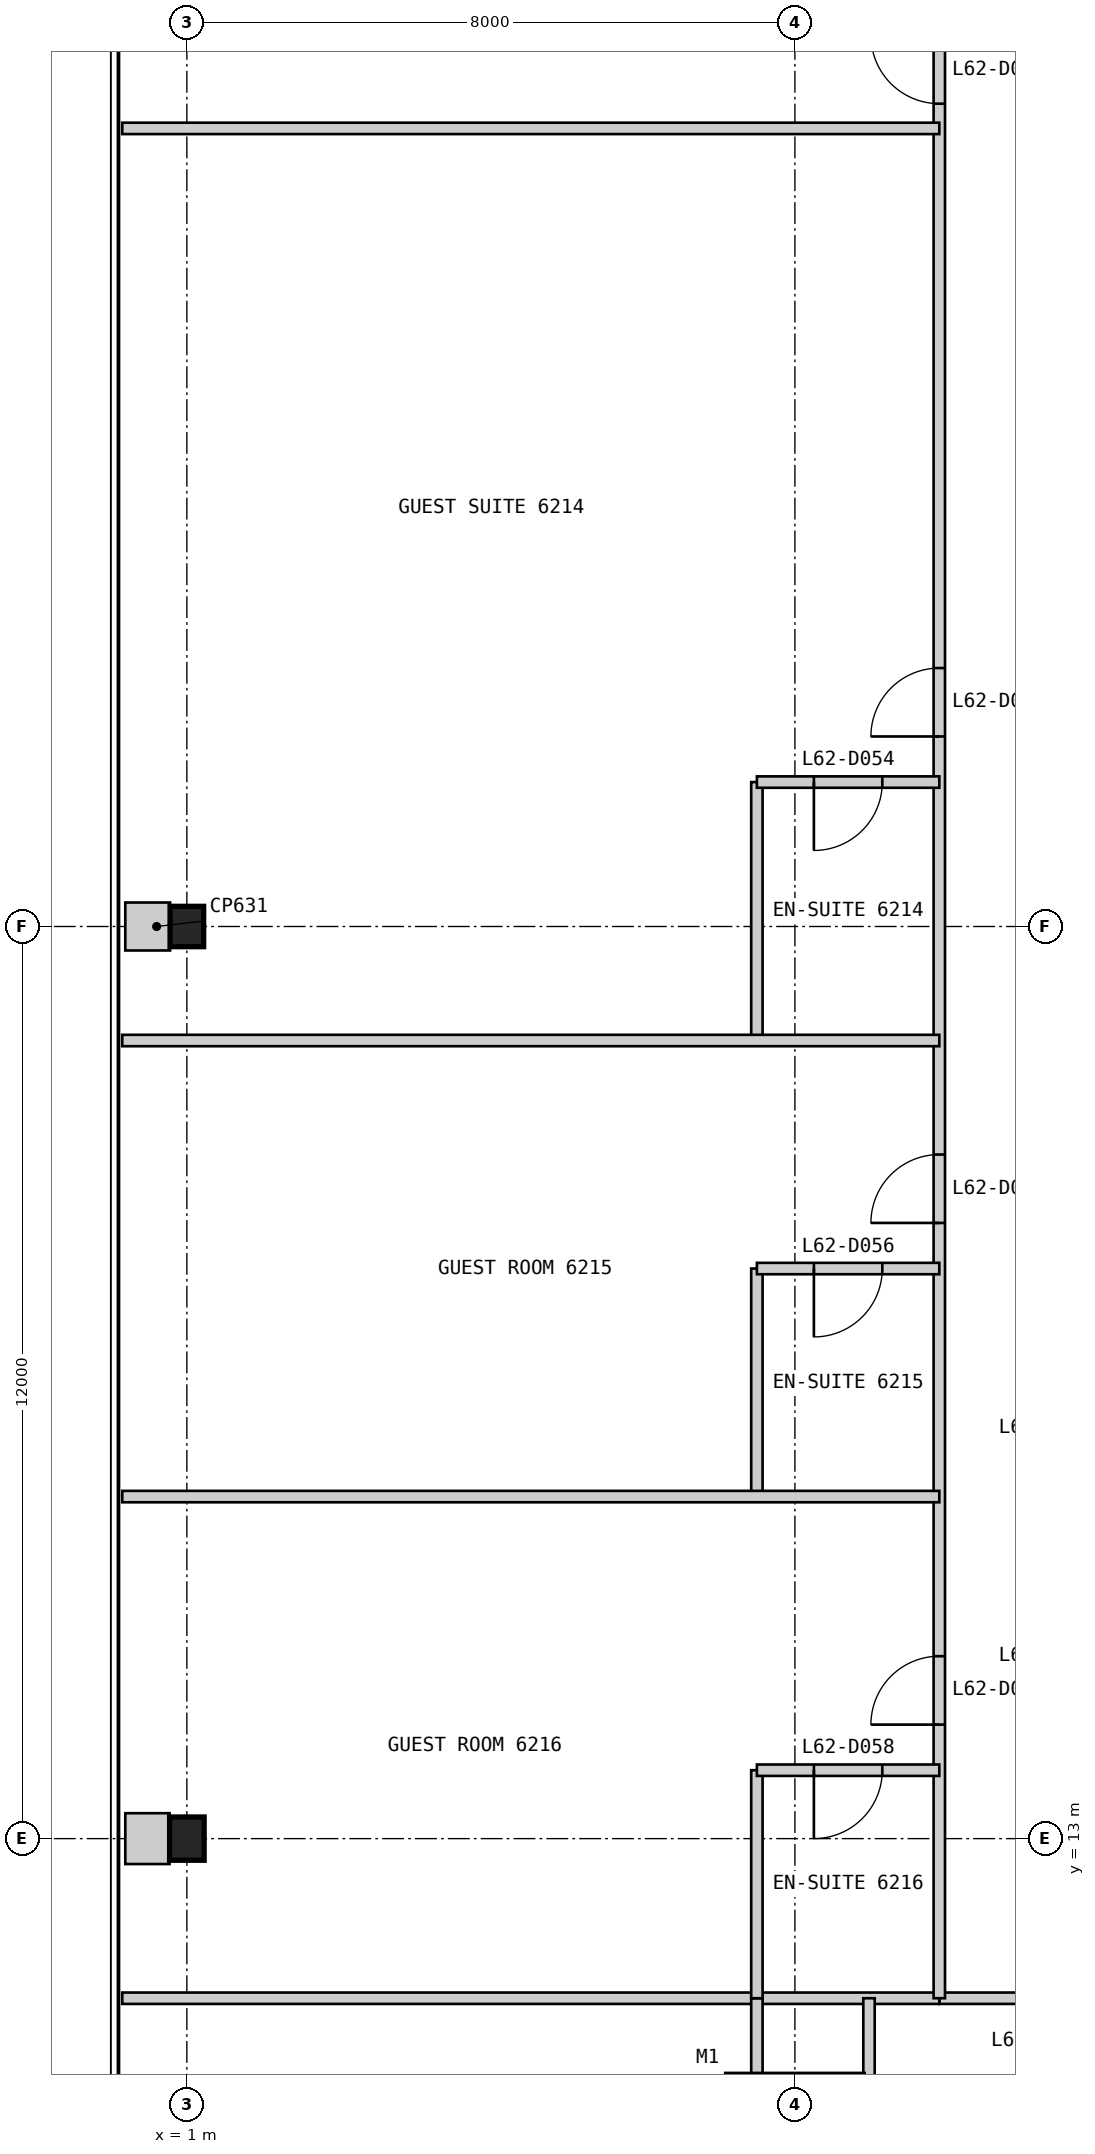
"""IFC4 building model, lengths in metres.
Left out: names, types, materials, properties, quantities, classifications, styles, units other than length and angle.
Written with IfcOpenShell. Run it as: python <this file> out.ifc"""

import sys

from ifc_helpers import new_model, si_unit, direction, frame, frame_2d, origin, origin_2d, place, context, subcontext, project, spatial, rectangle, i_section, extrude, element, fill, save


model = new_model("IFC4")
c1 = context("Model", 3, precision=1e-05, world=origin(), true_north=direction((0.0, 1.0)))
c2 = subcontext(c1, "Body", "Model", "MODEL_VIEW")
j1 = project(units=[si_unit("LENGTHUNIT", "METRE"), si_unit("PLANEANGLEUNIT", "RADIAN")], contexts=[c1])
p1 = place(None, origin())
s1 = spatial("IfcSite", under=j1, at=p1, CompositionType="ELEMENT")
p2 = place(p1, origin())
s2 = spatial("IfcBuilding", under=s1, at=p2, CompositionType="ELEMENT")
p3 = place(p2, frame((0.0, 0.0, 262.8)))
s3 = spatial("IfcBuildingStorey", under=s2, at=p3, CompositionType="ELEMENT", Elevation=262.8)
p4 = place(p3, frame((9.0, 9.0, 0.0), z_axis=(0.0, 0.0, 1.0), x_axis=(1.0, 0.0, 0.0)))
e1 = element("IfcColumn", 1, at=p4, inside=s3, PredefinedType="COLUMN", context=c2, shape_type="SweptSolid", body=[
    extrude(rectangle(XDim=1.8, YDim=1.8, at=origin_2d()), origin(), (0.0, 0.0, 1.0), 3.4),
])
p5 = place(p3, frame((1.0, 25.0, 0.0), z_axis=(0.0, 0.0, 1.0), x_axis=(1.0, 0.0, 0.0)))
e2 = element("IfcColumn", 2, at=p5, inside=s3, PredefinedType="COLUMN", context=c2, shape_type="SweptSolid", body=[
    extrude(i_section(OverallWidth=0.442, OverallDepth=0.531, WebThickness=0.066, FlangeThickness=0.106, at=origin_2d()), origin(), (0.0, 0.0, 1.0), 3.4),
])
p6 = place(p3, frame((1.0, 13.0, 0.0), z_axis=(0.0, 0.0, 1.0), x_axis=(1.0, 0.0, 0.0)))
e3 = element("IfcColumn", 3, at=p6, inside=s3, PredefinedType="COLUMN", context=c2, shape_type="SweptSolid", body=[
    extrude(i_section(OverallWidth=0.455, OverallDepth=0.569, WebThickness=0.078, FlangeThickness=0.125, at=origin_2d()), origin(), (0.0, 0.0, 1.0), 3.4),
])
p7 = place(p3, frame((10.9, 10.9, 0.0), z_axis=(0.0, 0.0, 1.0), x_axis=(1.0, 0.0, 0.0)))
e4 = element("IfcWall", 4, at=p7, inside=s3, PredefinedType="PARTITIONING", context=c2, shape_type="SweptSolid", body=[
    extrude(rectangle(XDim=28.2, YDim=0.15, at=frame_2d((14.1, 0.0))), origin(), (0.0, 0.0, 1.0), 3.25),
])
p8 = place(p7, frame((2.375, 0.0, 0.0)))
e5 = element("IfcOpeningElement", 5, at=p8, cuts=e4, PredefinedType="OPENING", context=c2, shape_type="SweptSolid", body=[
    extrude(rectangle(XDim=0.9, YDim=2.1, at=frame_2d((0.45, 1.05))), frame((0.0, 0.085, 0.0), z_axis=(0.0, -1.0, 0.0), x_axis=(1.0, 0.0, 0.0)), (0.0, 0.0, 1.0), 0.17),
])
p9 = place(p7, frame((10.7, 0.0, 0.0)))
e6 = element("IfcOpeningElement", 6, at=p9, cuts=e4, PredefinedType="OPENING", context=c2, shape_type="SweptSolid", body=[
    extrude(rectangle(XDim=0.9, YDim=2.1, at=frame_2d((0.45, 1.05))), frame((0.0, 0.085, 0.0), z_axis=(0.0, -1.0, 0.0), x_axis=(1.0, 0.0, 0.0)), (0.0, 0.0, 1.0), 0.17),
])
p10 = place(p7, frame((16.8, 0.0, 0.0)))
e7 = element("IfcOpeningElement", 7, at=p10, cuts=e4, PredefinedType="OPENING", context=c2, shape_type="SweptSolid", body=[
    extrude(rectangle(XDim=1.0, YDim=2.1, at=frame_2d((0.5, 1.05))), frame((0.0, 0.085, 0.0), z_axis=(0.0, -1.0, 0.0), x_axis=(1.0, 0.0, 0.0)), (0.0, 0.0, 1.0), 0.17),
])
p11 = place(p7, frame((23.7, 0.0, 0.0)))
e8 = element("IfcOpeningElement", 8, at=p11, cuts=e4, PredefinedType="OPENING", context=c2, shape_type="SweptSolid", body=[
    extrude(rectangle(XDim=0.9, YDim=2.1, at=frame_2d((0.45, 1.05))), frame((0.0, 0.085, 0.0), z_axis=(0.0, -1.0, 0.0), x_axis=(1.0, 0.0, 0.0)), (0.0, 0.0, 1.0), 0.17),
])
p12 = place(p3, frame((0.15, 10.9, 0.0), z_axis=(0.0, 0.0, 1.0), x_axis=(1.0, 0.0, 0.0)))
e9 = element("IfcWall", 9, at=p12, inside=s3, PredefinedType="PARTITIONING", context=c2, shape_type="SweptSolid", body=[
    extrude(rectangle(XDim=10.75, YDim=0.15, at=frame_2d((5.375, 0.0))), origin(), (0.0, 0.0, 1.0), 3.25),
])
p13 = place(p3, frame((9.975, 8.5, 0.0), z_axis=(0.0, 0.0, 1.0), x_axis=(0.0, 1.0, 0.0)))
e10 = element("IfcWall", 10, at=p13, inside=s3, PredefinedType="PARTITIONING", context=c2, shape_type="SweptSolid", body=[
    extrude(rectangle(XDim=2.4, YDim=0.15, at=frame_2d((1.2, 0.0))), origin(), (0.0, 0.0, 1.0), 3.25),
])
p14 = place(p3, frame((8.5, 0.15, 0.0), z_axis=(0.0, 0.0, 1.0), x_axis=(0.0, 1.0, 0.0)))
e11 = element("IfcWall", 11, at=p14, inside=s3, PredefinedType="PARTITIONING", context=c2, shape_type="SweptSolid", body=[
    extrude(rectangle(XDim=10.75, YDim=0.15, at=frame_2d((5.375, 0.0))), origin(), (0.0, 0.0, 1.0), 3.25),
])
p15 = place(p14, frame((5.0, 0.0, 0.0)))
e12 = element("IfcOpeningElement", 12, at=p15, cuts=e11, PredefinedType="OPENING", context=c2, shape_type="SweptSolid", body=[
    extrude(rectangle(XDim=0.9, YDim=2.1, at=frame_2d((0.45, 1.05))), frame((0.0, 0.085, 0.0), z_axis=(0.0, -1.0, 0.0), x_axis=(1.0, 0.0, 0.0)), (0.0, 0.0, 1.0), 0.17),
])
p16 = place(p3, frame((10.9, 39.1, 0.0), z_axis=(0.0, 0.0, 1.0), x_axis=(0.0, -1.0, 0.0)))
e13 = element("IfcWall", 13, at=p16, inside=s3, PredefinedType="PARTITIONING", context=c2, shape_type="SweptSolid", body=[
    extrude(rectangle(XDim=28.2, YDim=0.15, at=frame_2d((14.1, 0.0))), origin(), (0.0, 0.0, 1.0), 3.25),
])
p17 = place(p16, frame((2.375, 0.0, 0.0)))
e14 = element("IfcOpeningElement", 14, at=p17, cuts=e13, PredefinedType="OPENING", context=c2, shape_type="SweptSolid", body=[
    extrude(rectangle(XDim=0.9, YDim=2.1, at=frame_2d((0.45, 1.05))), frame((0.0, 0.085, 0.0), z_axis=(0.0, -1.0, 0.0), x_axis=(1.0, 0.0, 0.0)), (0.0, 0.0, 1.0), 0.17),
])
p18 = place(p16, frame((10.7, 0.0, 0.0)))
e15 = element("IfcOpeningElement", 15, at=p18, cuts=e13, PredefinedType="OPENING", context=c2, shape_type="SweptSolid", body=[
    extrude(rectangle(XDim=0.9, YDim=2.1, at=frame_2d((0.45, 1.05))), frame((0.0, 0.085, 0.0), z_axis=(0.0, -1.0, 0.0), x_axis=(1.0, 0.0, 0.0)), (0.0, 0.0, 1.0), 0.17),
])
p19 = place(p16, frame((17.1, 0.0, 0.0)))
e16 = element("IfcOpeningElement", 16, at=p19, cuts=e13, PredefinedType="OPENING", context=c2, shape_type="SweptSolid", body=[
    extrude(rectangle(XDim=0.9, YDim=2.1, at=frame_2d((0.45, 1.05))), frame((0.0, 0.085, 0.0), z_axis=(0.0, -1.0, 0.0), x_axis=(1.0, 0.0, 0.0)), (0.0, 0.0, 1.0), 0.17),
])
p20 = place(p16, frame((23.7, 0.0, 0.0)))
e17 = element("IfcOpeningElement", 17, at=p20, cuts=e13, PredefinedType="OPENING", context=c2, shape_type="SweptSolid", body=[
    extrude(rectangle(XDim=0.9, YDim=2.1, at=frame_2d((0.45, 1.05))), frame((0.0, 0.085, 0.0), z_axis=(0.0, -1.0, 0.0), x_axis=(1.0, 0.0, 0.0)), (0.0, 0.0, 1.0), 0.17),
])
p21 = place(p3, frame((0.15, 35.5, 0.0), z_axis=(0.0, 0.0, 1.0), x_axis=(1.0, 0.0, 0.0)))
e18 = element("IfcWall", 18, at=p21, inside=s3, PredefinedType="PARTITIONING", context=c2, shape_type="SweptSolid", body=[
    extrude(rectangle(XDim=10.75, YDim=0.15, at=frame_2d((5.375, 0.0))), origin(), (0.0, 0.0, 1.0), 3.25),
])
p22 = place(p3, frame((8.5, 26.9, 0.0), z_axis=(0.0, 0.0, 1.0), x_axis=(0.0, -1.0, 0.0)))
e19 = element("IfcWall", 19, at=p22, inside=s3, PredefinedType="PARTITIONING", context=c2, shape_type="SweptSolid", body=[
    extrude(rectangle(XDim=3.4, YDim=0.15, at=frame_2d((1.7, 0.0))), origin(), (0.0, 0.0, 1.0), 3.25),
])
p23 = place(p3, frame((8.5, 26.9, 0.0), z_axis=(0.0, 0.0, 1.0), x_axis=(1.0, 0.0, 0.0)))
e20 = element("IfcWall", 20, at=p23, inside=s3, PredefinedType="PARTITIONING", context=c2, shape_type="SweptSolid", body=[
    extrude(rectangle(XDim=2.4, YDim=0.15, at=frame_2d((1.2, 0.0))), origin(), (0.0, 0.0, 1.0), 3.25),
])
p24 = place(p23, frame((0.75, 0.0, 0.0)))
e21 = element("IfcOpeningElement", 21, at=p24, cuts=e20, PredefinedType="OPENING", context=c2, shape_type="SweptSolid", body=[
    extrude(rectangle(XDim=0.9, YDim=2.1, at=frame_2d((0.45, 1.05))), frame((0.0, 0.085, 0.0), z_axis=(0.0, -1.0, 0.0), x_axis=(1.0, 0.0, 0.0)), (0.0, 0.0, 1.0), 0.17),
])
p25 = place(p3, frame((0.15, 23.5, 0.0), z_axis=(0.0, 0.0, 1.0), x_axis=(1.0, 0.0, 0.0)))
e22 = element("IfcWall", 22, at=p25, inside=s3, PredefinedType="PARTITIONING", context=c2, shape_type="SweptSolid", body=[
    extrude(rectangle(XDim=10.75, YDim=0.15, at=frame_2d((5.375, 0.0))), origin(), (0.0, 0.0, 1.0), 3.25),
])
p26 = place(p3, frame((8.5, 20.5, 0.0), z_axis=(0.0, 0.0, 1.0), x_axis=(0.0, -1.0, 0.0)))
e23 = element("IfcWall", 23, at=p26, inside=s3, PredefinedType="PARTITIONING", context=c2, shape_type="SweptSolid", body=[
    extrude(rectangle(XDim=3.0, YDim=0.15, at=frame_2d((1.5, 0.0))), origin(), (0.0, 0.0, 1.0), 3.25),
])
p27 = place(p3, frame((8.5, 20.5, 0.0), z_axis=(0.0, 0.0, 1.0), x_axis=(1.0, 0.0, 0.0)))
e24 = element("IfcWall", 24, at=p27, inside=s3, PredefinedType="PARTITIONING", context=c2, shape_type="SweptSolid", body=[
    extrude(rectangle(XDim=2.4, YDim=0.15, at=frame_2d((1.2, 0.0))), origin(), (0.0, 0.0, 1.0), 3.25),
])
p28 = place(p27, frame((0.75, 0.0, 0.0)))
e25 = element("IfcOpeningElement", 25, at=p28, cuts=e24, PredefinedType="OPENING", context=c2, shape_type="SweptSolid", body=[
    extrude(rectangle(XDim=0.9, YDim=2.1, at=frame_2d((0.45, 1.05))), frame((0.0, 0.085, 0.0), z_axis=(0.0, -1.0, 0.0), x_axis=(1.0, 0.0, 0.0)), (0.0, 0.0, 1.0), 0.17),
])
p29 = place(p3, frame((0.15, 17.5, 0.0), z_axis=(0.0, 0.0, 1.0), x_axis=(1.0, 0.0, 0.0)))
e26 = element("IfcWall", 26, at=p29, inside=s3, PredefinedType="PARTITIONING", context=c2, shape_type="SweptSolid", body=[
    extrude(rectangle(XDim=10.75, YDim=0.15, at=frame_2d((5.375, 0.0))), origin(), (0.0, 0.0, 1.0), 3.25),
])
p30 = place(p3, frame((8.5, 13.9, 0.0), z_axis=(0.0, 0.0, 1.0), x_axis=(0.0, -1.0, 0.0)))
e27 = element("IfcWall", 27, at=p30, inside=s3, PredefinedType="PARTITIONING", context=c2, shape_type="SweptSolid", body=[
    extrude(rectangle(XDim=3.0, YDim=0.15, at=frame_2d((1.5, 0.0))), origin(), (0.0, 0.0, 1.0), 3.25),
])
p31 = place(p3, frame((8.5, 13.9, 0.0), z_axis=(0.0, 0.0, 1.0), x_axis=(1.0, 0.0, 0.0)))
e28 = element("IfcWall", 28, at=p31, inside=s3, PredefinedType="PARTITIONING", context=c2, shape_type="SweptSolid", body=[
    extrude(rectangle(XDim=2.4, YDim=0.15, at=frame_2d((1.2, 0.0))), origin(), (0.0, 0.0, 1.0), 3.25),
])
p32 = place(p31, frame((0.75, 0.0, 0.0)))
e29 = element("IfcOpeningElement", 29, at=p32, cuts=e28, PredefinedType="OPENING", context=c2, shape_type="SweptSolid", body=[
    extrude(rectangle(XDim=0.9, YDim=2.1, at=frame_2d((0.45, 1.05))), frame((0.0, 0.085, 0.0), z_axis=(0.0, -1.0, 0.0), x_axis=(1.0, 0.0, 0.0)), (0.0, 0.0, 1.0), 0.17),
])
p33 = place(p3, frame((0.19, 25.0, 0.0), z_axis=(0.0, 0.0, 1.0), x_axis=(1.0, 0.0, 0.0)))
e30 = element("IfcWall", 30, at=p33, inside=s3, PredefinedType="PARTITIONING", context=c2, shape_type="SweptSolid", body=[
    extrude(rectangle(XDim=0.589, YDim=0.631, at=frame_2d((0.294, 0.0))), origin(), (0.0, 0.0, 1.0), 3.25),
])
p34 = place(p3, frame((0.19, 13.0, 0.0), z_axis=(0.0, 0.0, 1.0), x_axis=(1.0, 0.0, 0.0)))
e31 = element("IfcWall", 31, at=p34, inside=s3, PredefinedType="PARTITIONING", context=c2, shape_type="SweptSolid", body=[
    extrude(rectangle(XDim=0.583, YDim=0.669, at=frame_2d((0.292, 0.0))), origin(), (0.0, 0.0, 1.0), 3.25),
])
p35 = place(p17, frame((0.9, 0.0, 0.0), z_axis=(0.0, 0.0, 1.0), x_axis=(-1.0, 0.0, 0.0)))
e32 = element("IfcDoor", 32, at=p35, inside=s3, OperationType="SINGLE_SWING_RIGHT", PredefinedType="DOOR", context=c2, shape_type="SweptSolid", body=[
    extrude(rectangle(XDim=0.9, YDim=2.1, at=frame_2d((0.45, 1.05))), frame((0.0, 0.025, 0.0), z_axis=(0.0, -1.0, 0.0), x_axis=(1.0, 0.0, 0.0)), (0.0, 0.0, 1.0), 0.05),
])
fill(e14, e32)
p36 = place(p24, frame((0.9, 0.0, 0.0), z_axis=(0.0, 0.0, 1.0), x_axis=(-1.0, 0.0, 0.0)))
e33 = element("IfcDoor", 33, at=p36, inside=s3, OperationType="SINGLE_SWING_RIGHT", PredefinedType="DOOR", context=c2, shape_type="SweptSolid", body=[
    extrude(rectangle(XDim=0.9, YDim=2.1, at=frame_2d((0.45, 1.05))), frame((0.0, 0.025, 0.0), z_axis=(0.0, -1.0, 0.0), x_axis=(1.0, 0.0, 0.0)), (0.0, 0.0, 1.0), 0.05),
])
fill(e21, e33)
p37 = place(p18, frame((0.9, 0.0, 0.0), z_axis=(0.0, 0.0, 1.0), x_axis=(-1.0, 0.0, 0.0)))
e34 = element("IfcDoor", 34, at=p37, inside=s3, OperationType="SINGLE_SWING_LEFT", PredefinedType="DOOR", context=c2, shape_type="SweptSolid", body=[
    extrude(rectangle(XDim=0.9, YDim=2.1, at=frame_2d((0.45, 1.05))), frame((0.0, 0.025, 0.0), z_axis=(0.0, -1.0, 0.0), x_axis=(1.0, 0.0, 0.0)), (0.0, 0.0, 1.0), 0.05),
])
fill(e15, e34)
p38 = place(p28, frame((0.9, 0.0, 0.0), z_axis=(0.0, 0.0, 1.0), x_axis=(-1.0, 0.0, 0.0)))
e35 = element("IfcDoor", 35, at=p38, inside=s3, OperationType="SINGLE_SWING_RIGHT", PredefinedType="DOOR", context=c2, shape_type="SweptSolid", body=[
    extrude(rectangle(XDim=0.9, YDim=2.1, at=frame_2d((0.45, 1.05))), frame((0.0, 0.025, 0.0), z_axis=(0.0, -1.0, 0.0), x_axis=(1.0, 0.0, 0.0)), (0.0, 0.0, 1.0), 0.05),
])
fill(e25, e35)
p39 = place(p19, frame((0.9, 0.0, 0.0), z_axis=(0.0, 0.0, 1.0), x_axis=(-1.0, 0.0, 0.0)))
e36 = element("IfcDoor", 36, at=p39, inside=s3, OperationType="SINGLE_SWING_LEFT", PredefinedType="DOOR", context=c2, shape_type="SweptSolid", body=[
    extrude(rectangle(XDim=0.9, YDim=2.1, at=frame_2d((0.45, 1.05))), frame((0.0, 0.025, 0.0), z_axis=(0.0, -1.0, 0.0), x_axis=(1.0, 0.0, 0.0)), (0.0, 0.0, 1.0), 0.05),
])
fill(e16, e36)
p40 = place(p32, frame((0.9, 0.0, 0.0), z_axis=(0.0, 0.0, 1.0), x_axis=(-1.0, 0.0, 0.0)))
e37 = element("IfcDoor", 37, at=p40, inside=s3, OperationType="SINGLE_SWING_RIGHT", PredefinedType="DOOR", context=c2, shape_type="SweptSolid", body=[
    extrude(rectangle(XDim=0.9, YDim=2.1, at=frame_2d((0.45, 1.05))), frame((0.0, 0.025, 0.0), z_axis=(0.0, -1.0, 0.0), x_axis=(1.0, 0.0, 0.0)), (0.0, 0.0, 1.0), 0.05),
])
fill(e29, e37)
p41 = place(p20, frame((0.9, 0.0, 0.0), z_axis=(0.0, 0.0, 1.0), x_axis=(-1.0, 0.0, 0.0)))
e38 = element("IfcDoor", 38, at=p41, inside=s3, OperationType="SINGLE_SWING_LEFT", PredefinedType="DOOR", context=c2, shape_type="SweptSolid", body=[
    extrude(rectangle(XDim=0.9, YDim=2.1, at=frame_2d((0.45, 1.05))), frame((0.0, 0.025, 0.0), z_axis=(0.0, -1.0, 0.0), x_axis=(1.0, 0.0, 0.0)), (0.0, 0.0, 1.0), 0.05),
])
fill(e17, e38)
save(model, sys.argv[1])
